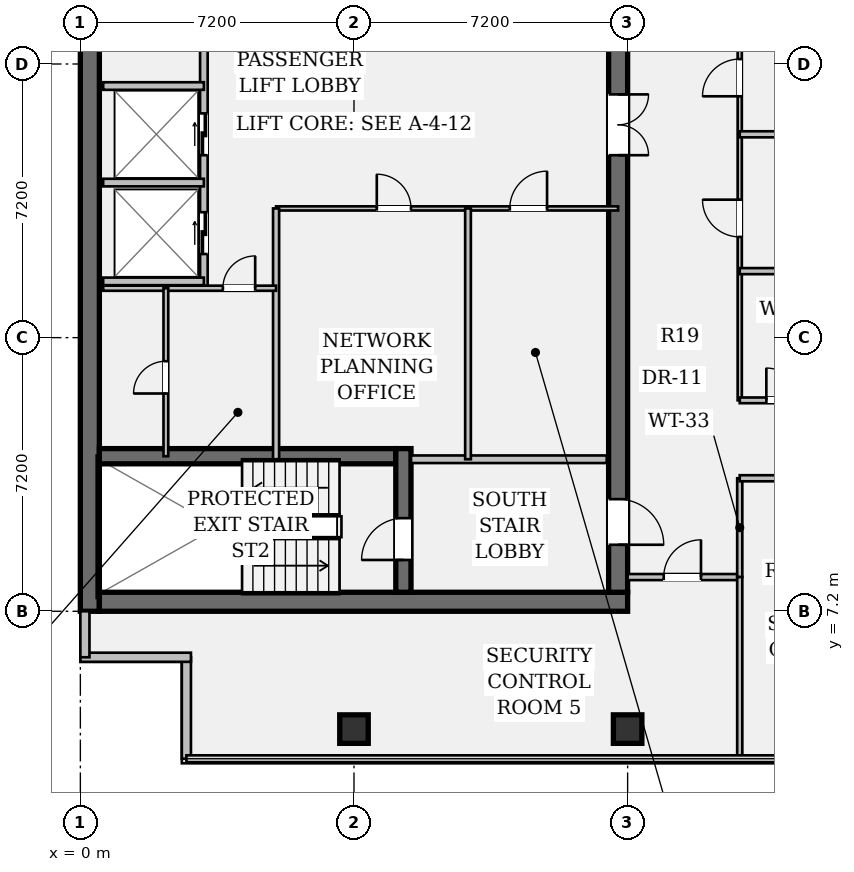
"""IFC4 building model, lengths in metres.
Left out: names, types, materials, properties, quantities, classifications, styles, units other than length and angle.
Written with IfcOpenShell. Run it as: python <this file> out.ifc"""

import sys

from ifc_helpers import new_model, si_unit, direction, frame, frame_2d, origin, origin_2d, place, context, subcontext, project, spatial, rectangle, hollow_rectangle, extrude, element, fill, save


model = new_model("IFC4")
c1 = context("Model", 3, precision=1e-05, world=origin(), true_north=direction((0.0, 1.0)))
c2 = subcontext(c1, "Body", "Model", "MODEL_VIEW")
j1 = project(units=[si_unit("LENGTHUNIT", "METRE"), si_unit("PLANEANGLEUNIT", "RADIAN")], contexts=[c1])
p1 = place(None, origin())
s1 = spatial("IfcSite", under=j1, at=p1, CompositionType="ELEMENT")
p2 = place(p1, origin())
s2 = spatial("IfcBuilding", under=s1, at=p2, CompositionType="ELEMENT")
p3 = place(p2, frame((0.0, 0.0, 218.75)))
s3 = spatial("IfcBuildingStorey", under=s2, at=p3, CompositionType="ELEMENT", Elevation=218.75)
p4 = place(p3, frame((0.25, 7.2, 0.0), z_axis=(0.0, 0.0, 1.0), x_axis=(0.0, 1.0, 0.0)))
e1 = element("IfcWall", 1, at=p4, inside=s3, PredefinedType="SHEAR", context=c2, shape_type="SweptSolid", body=[
    extrude(rectangle(XDim=28.8, YDim=0.5, at=frame_2d((14.4, 0.0))), origin(), (0.0, 0.0, 1.0), 3.24),
])
p5 = place(p3, frame((0.5, 7.45, 0.0), z_axis=(0.0, 0.0, 1.0), x_axis=(1.0, 0.0, 0.0)))
e2 = element("IfcWall", 2, at=p5, inside=s3, PredefinedType="SHEAR", context=c2, shape_type="SweptSolid", body=[
    extrude(rectangle(XDim=13.9, YDim=0.5, at=frame_2d((6.95, 0.0))), origin(), (0.0, 0.0, 1.0), 3.24),
])
p6 = place(p3, frame((14.15, 35.5, 0.0), z_axis=(0.0, 0.0, 1.0), x_axis=(0.0, -1.0, 0.0)))
e3 = element("IfcWall", 3, at=p6, inside=s3, PredefinedType="SHEAR", context=c2, shape_type="SweptSolid", body=[
    extrude(rectangle(XDim=27.8, YDim=0.5, at=frame_2d((13.9, 0.0))), origin(), (0.0, 0.0, 1.0), 3.24),
])
p7 = place(p6, frame((1.4, 0.0, 0.0)))
e4 = element("IfcOpeningElement", 4, at=p7, cuts=e3, PredefinedType="OPENING", context=c2, shape_type="SweptSolid", body=[
    extrude(rectangle(XDim=1.2, YDim=2.15, at=frame_2d((0.6, 1.075))), frame((0.0, 0.262, 0.0), z_axis=(0.0, -1.0, 0.0), x_axis=(1.0, 0.0, 0.0)), (0.0, 0.0, 1.0), 0.524),
])
p8 = place(p6, frame((25.35, 0.0, 0.0)))
e5 = element("IfcOpeningElement", 5, at=p8, cuts=e3, PredefinedType="OPENING", context=c2, shape_type="SweptSolid", body=[
    extrude(rectangle(XDim=1.2, YDim=2.15, at=frame_2d((0.6, 1.075))), frame((0.0, 0.262, 0.0), z_axis=(0.0, -1.0, 0.0), x_axis=(1.0, 0.0, 0.0)), (0.0, 0.0, 1.0), 0.524),
])
p9 = place(p6, frame((14.7, 0.0, 0.0)))
e6 = element("IfcOpeningElement", 6, at=p9, cuts=e3, PredefinedType="OPENING", context=c2, shape_type="SweptSolid", body=[
    extrude(rectangle(XDim=1.6, YDim=2.2, at=frame_2d((0.8, 1.1))), frame((0.0, 0.262, 0.0), z_axis=(0.0, -1.0, 0.0), x_axis=(1.0, 0.0, 0.0)), (0.0, 0.0, 1.0), 0.524),
])
p10 = place(p3, frame((0.5, 11.28, 0.0), z_axis=(0.0, 0.0, 1.0), x_axis=(1.0, 0.0, 0.0)))
e7 = element("IfcWall", 7, at=p10, inside=s3, PredefinedType="SHEAR", context=c2, shape_type="SweptSolid", body=[
    extrude(rectangle(XDim=7.8, YDim=0.4, at=frame_2d((3.9, 0.0))), origin(), (0.0, 0.0, 1.0), 3.24),
])
p11 = place(p3, frame((8.5, 7.7, 0.0), z_axis=(0.0, 0.0, 1.0), x_axis=(0.0, 1.0, 0.0)))
e8 = element("IfcWall", 8, at=p11, inside=s3, PredefinedType="SHEAR", context=c2, shape_type="SweptSolid", body=[
    extrude(rectangle(XDim=3.78, YDim=0.4, at=frame_2d((1.89, 0.0))), origin(), (0.0, 0.0, 1.0), 3.24),
])
p12 = place(p11, frame((0.85, 0.0, 0.0)))
e9 = element("IfcOpeningElement", 9, at=p12, cuts=e8, PredefinedType="OPENING", context=c2, shape_type="SweptSolid", body=[
    extrude(rectangle(XDim=1.1, YDim=2.15, at=frame_2d((0.55, 1.075))), frame((0.0, 0.212, 0.0), z_axis=(0.0, -1.0, 0.0), x_axis=(1.0, 0.0, 0.0)), (0.0, 0.0, 1.0), 0.424),
])
for number, where, z_axis, x_axis in (
    (10, (7.2, 4.1, 0.0), (0.0, 0.0, 1.0), (1.0, 0.0, 0.0)),
    (11, (14.4, 4.1, 0.0), (0.0, 0.0, 1.0), (1.0, 0.0, 0.0)),
):
    element("IfcColumn", number, at=place(p3, frame(where, z_axis=z_axis, x_axis=x_axis)), inside=s3, PredefinedType="COLUMN", context=c2, shape_type="SweptSolid", body=[
        extrude(hollow_rectangle(XDim=0.75, YDim=0.75, WallThickness=0.045, at=origin_2d()), origin(), (0.0, 0.0, 1.0), 3.24),
    ])
p13 = place(p3, frame((2.79, 3.32, 0.0), z_axis=(0.0, 0.0, 1.0), x_axis=(0.0, 1.0, 0.0)))
e12 = element("IfcWall", 12, at=p13, inside=s3, PredefinedType="STANDARD", context=c2, shape_type="SweptSolid", body=[
    extrude(rectangle(XDim=2.67, YDim=0.24, at=frame_2d((1.335, 0.0))), origin(), (0.0, 0.0, 1.0), 3.24),
])
p14 = place(p3, frame((2.91, 5.99, 0.0), z_axis=(0.0, 0.0, 1.0), x_axis=(-1.0, 0.0, 0.0)))
e13 = element("IfcWall", 13, at=p14, inside=s3, PredefinedType="STANDARD", context=c2, shape_type="SweptSolid", body=[
    extrude(rectangle(XDim=2.91, YDim=0.24, at=frame_2d((1.455, 0.0))), origin(), (0.0, 0.0, 1.0), 3.24),
])
p15 = place(p3, frame((0.12, 5.99, 0.0), z_axis=(0.0, 0.0, 1.0), x_axis=(0.0, 1.0, 0.0)))
e14 = element("IfcWall", 14, at=p15, inside=s3, PredefinedType="STANDARD", context=c2, shape_type="SweptSolid", body=[
    extrude(rectangle(XDim=1.21, YDim=0.24, at=frame_2d((0.605, 0.0))), origin(), (0.0, 0.0, 1.0), 3.24),
])
p16 = place(p3, frame((8.7, 11.2, 0.0), z_axis=(0.0, 0.0, 1.0), x_axis=(1.0, 0.0, 0.0)))
e15 = element("IfcWall", 15, at=p16, inside=s3, PredefinedType="PARTITIONING", context=c2, shape_type="SweptSolid", body=[
    extrude(rectangle(XDim=5.15, YDim=0.2, at=frame_2d((2.575, 0.0))), origin(), (0.0, 0.0, 1.0), 3.24),
])
p17 = place(p3, frame((3.25, 15.7, 0.0), z_axis=(0.0, 0.0, 1.0), x_axis=(0.0, 1.0, 0.0)))
e16 = element("IfcWall", 16, at=p17, inside=s3, PredefinedType="PARTITIONING", context=c2, shape_type="SweptSolid", body=[
    extrude(rectangle(XDim=13.08, YDim=0.2, at=frame_2d((6.54, 0.0))), origin(), (0.0, 0.0, 1.0), 3.24),
])
p18 = place(p17, frame((0.9, 0.0, 0.0)))
e17 = element("IfcOpeningElement", 17, at=p18, cuts=e16, PredefinedType="OPENING", context=c2, shape_type="SweptSolid", body=[
    extrude(rectangle(XDim=1.1, YDim=2.2, at=frame_2d((0.55, 1.1))), frame((0.0, 0.112, 0.0), z_axis=(0.0, -1.0, 0.0), x_axis=(1.0, 0.0, 0.0)), (0.0, 0.0, 1.0), 0.224),
])
p19 = place(p17, frame((3.5, 0.0, 0.0)))
e18 = element("IfcOpeningElement", 18, at=p19, cuts=e16, PredefinedType="OPENING", context=c2, shape_type="SweptSolid", body=[
    extrude(rectangle(XDim=1.1, YDim=2.2, at=frame_2d((0.55, 1.1))), frame((0.0, 0.112, 0.0), z_axis=(0.0, -1.0, 0.0), x_axis=(1.0, 0.0, 0.0)), (0.0, 0.0, 1.0), 0.224),
])
p20 = place(p17, frame((7.2, 0.0, 0.0)))
e19 = element("IfcOpeningElement", 19, at=p20, cuts=e16, PredefinedType="OPENING", context=c2, shape_type="SweptSolid", body=[
    extrude(rectangle(XDim=1.1, YDim=2.2, at=frame_2d((0.55, 1.1))), frame((0.0, 0.112, 0.0), z_axis=(0.0, -1.0, 0.0), x_axis=(1.0, 0.0, 0.0)), (0.0, 0.0, 1.0), 0.224),
])
p21 = place(p17, frame((9.8, 0.0, 0.0)))
e20 = element("IfcOpeningElement", 20, at=p21, cuts=e16, PredefinedType="OPENING", context=c2, shape_type="SweptSolid", body=[
    extrude(rectangle(XDim=1.1, YDim=2.2, at=frame_2d((0.55, 1.1))), frame((0.0, 0.112, 0.0), z_axis=(0.0, -1.0, 0.0), x_axis=(1.0, 0.0, 0.0)), (0.0, 0.0, 1.0), 0.224),
])
for number, where, z_axis, x_axis in (
    (21, (0.6, 15.88, 0.0), (0.0, 0.0, 1.0), (1.0, 0.0, 0.0)),
    (22, (0.6, 18.48, 0.0), (0.0, 0.0, 1.0), (1.0, 0.0, 0.0)),
    (23, (0.6, 21.02, 0.0), (0.0, 0.0, 1.0), (1.0, 0.0, 0.0)),
):
    element("IfcWall", number, at=place(p3, frame(where, z_axis=z_axis, x_axis=x_axis)), inside=s3, PredefinedType="PARTITIONING", context=c2, shape_type="SweptSolid", body=[
        extrude(rectangle(XDim=2.65, YDim=0.2, at=frame_2d((1.325, 0.0))), origin(), (0.0, 0.0, 1.0), 3.24),
    ])
p22 = place(p3, frame((5.15, 17.8, 0.0), z_axis=(0.0, 0.0, 1.0), x_axis=(1.0, 0.0, 0.0)))
e24 = element("IfcWall", 24, at=p22, inside=s3, PredefinedType="PARTITIONING", context=c2, shape_type="SweptSolid", body=[
    extrude(rectangle(XDim=9.0, YDim=0.11, at=frame_2d((4.5, 0.0))), origin(), (0.0, 0.0, 1.0), 3.24),
])
p23 = place(p22, frame((2.65, 0.0, 0.0)))
e25 = element("IfcOpeningElement", 25, at=p23, cuts=e24, PredefinedType="OPENING", context=c2, shape_type="SweptSolid", body=[
    extrude(rectangle(XDim=0.9, YDim=2.15, at=frame_2d((0.45, 1.075))), frame((0.0, 0.067, 0.0), z_axis=(0.0, -1.0, 0.0), x_axis=(1.0, 0.0, 0.0)), (0.0, 0.0, 1.0), 0.134),
])
p24 = place(p22, frame((6.15, 0.0, 0.0)))
e26 = element("IfcOpeningElement", 26, at=p24, cuts=e24, PredefinedType="OPENING", context=c2, shape_type="SweptSolid", body=[
    extrude(rectangle(XDim=0.98, YDim=2.15, at=frame_2d((0.49, 1.075))), frame((0.0, 0.067, 0.0), z_axis=(0.0, -1.0, 0.0), x_axis=(1.0, 0.0, 0.0)), (0.0, 0.0, 1.0), 0.134),
])
p25 = place(p3, frame((5.15, 11.2, 0.0), z_axis=(0.0, 0.0, 1.0), x_axis=(0.0, 1.0, 0.0)))
e27 = element("IfcWall", 27, at=p25, inside=s3, PredefinedType="PARTITIONING", context=c2, shape_type="SweptSolid", body=[
    extrude(rectangle(XDim=6.6, YDim=0.16, at=frame_2d((3.3, 0.0))), origin(), (0.0, 0.0, 1.0), 3.24),
])
p26 = place(p3, frame((10.2, 11.2, 0.0), z_axis=(0.0, 0.0, 1.0), x_axis=(0.0, 1.0, 0.0)))
e28 = element("IfcWall", 28, at=p26, inside=s3, PredefinedType="PARTITIONING", context=c2, shape_type="SweptSolid", body=[
    extrude(rectangle(XDim=6.6, YDim=0.15, at=frame_2d((3.3, 0.0))), origin(), (0.0, 0.0, 1.0), 3.24),
])
p27 = place(p3, frame((0.6, 15.7, 0.0), z_axis=(0.0, 0.0, 1.0), x_axis=(1.0, 0.0, 0.0)))
e29 = element("IfcWall", 29, at=p27, inside=s3, PredefinedType="PARTITIONING", context=c2, shape_type="SweptSolid", body=[
    extrude(rectangle(XDim=4.55, YDim=0.135, at=frame_2d((2.275, 0.0))), origin(), (0.0, 0.0, 1.0), 3.24),
])
p28 = place(p27, frame((3.15, 0.0, 0.0)))
e30 = element("IfcOpeningElement", 30, at=p28, cuts=e29, PredefinedType="OPENING", context=c2, shape_type="SweptSolid", body=[
    extrude(rectangle(XDim=0.85, YDim=2.15, at=frame_2d((0.425, 1.075))), frame((0.0, 0.08, 0.0), z_axis=(0.0, -1.0, 0.0), x_axis=(1.0, 0.0, 0.0)), (0.0, 0.0, 1.0), 0.159),
])
p29 = place(p3, frame((2.25, 11.28, 0.0), z_axis=(0.0, 0.0, 1.0), x_axis=(0.0, 1.0, 0.0)))
e31 = element("IfcWall", 31, at=p29, inside=s3, PredefinedType="PARTITIONING", context=c2, shape_type="SweptSolid", body=[
    extrude(rectangle(XDim=4.42, YDim=0.125, at=frame_2d((2.21, 0.0))), origin(), (0.0, 0.0, 1.0), 3.24),
])
p30 = place(p29, frame((1.65, 0.0, 0.0)))
e32 = element("IfcOpeningElement", 32, at=p30, cuts=e31, PredefinedType="OPENING", context=c2, shape_type="SweptSolid", body=[
    extrude(rectangle(XDim=0.85, YDim=2.15, at=frame_2d((0.425, 1.075))), frame((0.0, 0.074, 0.0), z_axis=(0.0, -1.0, 0.0), x_axis=(1.0, 0.0, 0.0)), (0.0, 0.0, 1.0), 0.149),
])
p31 = place(p3, frame((14.4, 8.1, 0.0), z_axis=(0.0, 0.0, 1.0), x_axis=(1.0, 0.0, 0.0)))
e33 = element("IfcWall", 33, at=p31, inside=s3, PredefinedType="PARTITIONING", context=c2, shape_type="SweptSolid", body=[
    extrude(rectangle(XDim=2.95, YDim=0.16, at=frame_2d((1.475, 0.0))), origin(), (0.0, 0.0, 1.0), 2.808),
])
p32 = place(p31, frame((0.95, 0.0, 0.0)))
e34 = element("IfcOpeningElement", 34, at=p32, cuts=e33, PredefinedType="OPENING", context=c2, shape_type="SweptSolid", body=[
    extrude(rectangle(XDim=0.98, YDim=2.15, at=frame_2d((0.49, 1.075))), frame((0.0, 0.092, 0.0), z_axis=(0.0, -1.0, 0.0), x_axis=(1.0, 0.0, 0.0)), (0.0, 0.0, 1.0), 0.184),
])
p33 = place(p3, frame((17.35, 8.1, 0.0), z_axis=(0.0, 0.0, 1.0), x_axis=(0.0, 1.0, 0.0)))
e35 = element("IfcWall", 35, at=p33, inside=s3, PredefinedType="PARTITIONING", context=c2, shape_type="SweptSolid", body=[
    extrude(rectangle(XDim=2.6, YDim=0.135, at=frame_2d((1.3, 0.0))), origin(), (0.0, 0.0, 1.0), 3.24),
])
p34 = place(p3, frame((17.35, 12.75, 0.0), z_axis=(0.0, 0.0, 1.0), x_axis=(0.0, 1.0, 0.0)))
e36 = element("IfcWall", 36, at=p34, inside=s3, PredefinedType="PARTITIONING", context=c2, shape_type="SweptSolid", body=[
    extrude(rectangle(XDim=22.45, YDim=0.11, at=frame_2d((11.225, 0.0))), origin(), (0.0, 0.0, 1.0), 2.613),
])
p35 = place(p34, frame((4.3, 0.0, 0.0)))
e37 = element("IfcOpeningElement", 37, at=p35, cuts=e36, PredefinedType="OPENING", context=c2, shape_type="SweptSolid", body=[
    extrude(rectangle(XDim=0.98, YDim=2.15, at=frame_2d((0.49, 1.075))), frame((0.0, 0.067, 0.0), z_axis=(0.0, -1.0, 0.0), x_axis=(1.0, 0.0, 0.0)), (0.0, 0.0, 1.0), 0.134),
])
p36 = place(p34, frame((8.0, 0.0, 0.0)))
e38 = element("IfcOpeningElement", 38, at=p36, cuts=e36, PredefinedType="OPENING", context=c2, shape_type="SweptSolid", body=[
    extrude(rectangle(XDim=0.98, YDim=2.15, at=frame_2d((0.49, 1.075))), frame((0.0, 0.067, 0.0), z_axis=(0.0, -1.0, 0.0), x_axis=(1.0, 0.0, 0.0)), (0.0, 0.0, 1.0), 0.134),
])
p37 = place(p34, frame((16.02, 0.0, 0.0)))
e39 = element("IfcOpeningElement", 39, at=p37, cuts=e36, PredefinedType="OPENING", context=c2, shape_type="SweptSolid", body=[
    extrude(rectangle(XDim=0.98, YDim=2.15, at=frame_2d((0.49, 1.075))), frame((0.0, 0.067, 0.0), z_axis=(0.0, -1.0, 0.0), x_axis=(1.0, 0.0, 0.0)), (0.0, 0.0, 1.0), 0.134),
])
p38 = place(p3, frame((17.35, 10.7, 0.0), z_axis=(0.0, 0.0, 1.0), x_axis=(1.0, 0.0, 0.0)))
e40 = element("IfcWall", 40, at=p38, inside=s3, PredefinedType="PARTITIONING", context=c2, shape_type="SweptSolid", body=[
    extrude(rectangle(XDim=15.6, YDim=0.16, at=frame_2d((7.8, 0.0))), origin(), (0.0, 0.0, 1.0), 2.613),
])
p39 = place(p38, frame((2.02, 0.0, 0.0)))
e41 = element("IfcOpeningElement", 41, at=p39, cuts=e40, PredefinedType="OPENING", context=c2, shape_type="SweptSolid", body=[
    extrude(rectangle(XDim=0.98, YDim=2.15, at=frame_2d((0.49, 1.075))), frame((0.0, 0.092, 0.0), z_axis=(0.0, -1.0, 0.0), x_axis=(1.0, 0.0, 0.0)), (0.0, 0.0, 1.0), 0.184),
])
p40 = place(p38, frame((7.15, 0.0, 0.0)))
e42 = element("IfcOpeningElement", 42, at=p40, cuts=e40, PredefinedType="OPENING", context=c2, shape_type="SweptSolid", body=[
    extrude(rectangle(XDim=0.98, YDim=2.15, at=frame_2d((0.49, 1.075))), frame((0.0, 0.092, 0.0), z_axis=(0.0, -1.0, 0.0), x_axis=(1.0, 0.0, 0.0)), (0.0, 0.0, 1.0), 0.184),
])
p41 = place(p38, frame((12.43, 0.0, 0.0)))
e43 = element("IfcOpeningElement", 43, at=p41, cuts=e40, PredefinedType="OPENING", context=c2, shape_type="SweptSolid", body=[
    extrude(rectangle(XDim=0.98, YDim=2.15, at=frame_2d((0.49, 1.075))), frame((0.0, 0.092, 0.0), z_axis=(0.0, -1.0, 0.0), x_axis=(1.0, 0.0, 0.0)), (0.0, 0.0, 1.0), 0.184),
])
p42 = place(p3, frame((17.35, 12.75, 0.0), z_axis=(0.0, 0.0, 1.0), x_axis=(1.0, 0.0, 0.0)))
e44 = element("IfcWall", 44, at=p42, inside=s3, PredefinedType="PARTITIONING", context=c2, shape_type="SweptSolid", body=[
    extrude(rectangle(XDim=15.6, YDim=0.15, at=frame_2d((7.8, 0.0))), origin(), (0.0, 0.0, 1.0), 2.613),
])
p43 = place(p42, frame((0.7, 0.0, 0.0)))
e45 = element("IfcOpeningElement", 45, at=p43, cuts=e44, PredefinedType="OPENING", context=c2, shape_type="SweptSolid", body=[
    extrude(rectangle(XDim=0.85, YDim=2.15, at=frame_2d((0.425, 1.075))), frame((0.0, 0.087, 0.0), z_axis=(0.0, -1.0, 0.0), x_axis=(1.0, 0.0, 0.0)), (0.0, 0.0, 1.0), 0.174),
])
p44 = place(p42, frame((3.95, 0.0, 0.0)))
e46 = element("IfcOpeningElement", 46, at=p44, cuts=e44, PredefinedType="OPENING", context=c2, shape_type="SweptSolid", body=[
    extrude(rectangle(XDim=0.85, YDim=2.15, at=frame_2d((0.425, 1.075))), frame((0.0, 0.087, 0.0), z_axis=(0.0, -1.0, 0.0), x_axis=(1.0, 0.0, 0.0)), (0.0, 0.0, 1.0), 0.174),
])
p45 = place(p42, frame((6.46, 0.0, 0.0)))
e47 = element("IfcOpeningElement", 47, at=p45, cuts=e44, PredefinedType="OPENING", context=c2, shape_type="SweptSolid", body=[
    extrude(rectangle(XDim=0.85, YDim=2.15, at=frame_2d((0.425, 1.075))), frame((0.0, 0.087, 0.0), z_axis=(0.0, -1.0, 0.0), x_axis=(1.0, 0.0, 0.0)), (0.0, 0.0, 1.0), 0.174),
])
p46 = place(p42, frame((9.5, 0.0, 0.0)))
e48 = element("IfcOpeningElement", 48, at=p46, cuts=e44, PredefinedType="OPENING", context=c2, shape_type="SweptSolid", body=[
    extrude(rectangle(XDim=0.98, YDim=2.15, at=frame_2d((0.49, 1.075))), frame((0.0, 0.087, 0.0), z_axis=(0.0, -1.0, 0.0), x_axis=(1.0, 0.0, 0.0)), (0.0, 0.0, 1.0), 0.174),
])
p47 = place(p3, frame((17.35, 16.15, 0.0), z_axis=(0.0, 0.0, 1.0), x_axis=(1.0, 0.0, 0.0)))
e49 = element("IfcWall", 49, at=p47, inside=s3, PredefinedType="PARTITIONING", context=c2, shape_type="SweptSolid", body=[
    extrude(rectangle(XDim=8.85, YDim=0.16, at=frame_2d((4.425, 0.0))), origin(), (0.0, 0.0, 1.0), 2.613),
])
p48 = place(p3, frame((17.35, 19.75, 0.0), z_axis=(0.0, 0.0, 1.0), x_axis=(1.0, 0.0, 0.0)))
e50 = element("IfcWall", 50, at=p48, inside=s3, PredefinedType="PARTITIONING", context=c2, shape_type="SweptSolid", body=[
    extrude(rectangle(XDim=6.53, YDim=0.16, at=frame_2d((3.265, 0.0))), origin(), (0.0, 0.0, 1.0), 2.613),
])
p49 = place(p3, frame((17.35, 3.32, 0.0), z_axis=(0.0, 0.0, 1.0), x_axis=(0.0, 1.0, 0.0)))
e51 = element("IfcWall", 51, at=p49, inside=s3, PredefinedType="PARTITIONING", context=c2, shape_type="SweptSolid", body=[
    extrude(rectangle(XDim=4.78, YDim=0.135, at=frame_2d((2.39, 0.0))), origin(), (0.0, 0.0, 1.0), 2.613),
])
p50 = place(p12, origin())
e52 = element("IfcDoor", 52, at=p50, inside=s3, OperationType="SINGLE_SWING_LEFT", PredefinedType="DOOR", context=c2, shape_type="SweptSolid", body=[
    extrude(rectangle(XDim=1.1, YDim=2.15, at=frame_2d((0.55, 1.075))), frame((0.0, 0.025, 0.0), z_axis=(0.0, -1.0, 0.0), x_axis=(1.0, 0.0, 0.0)), (0.0, 0.0, 1.0), 0.05),
])
fill(e9, e52)
p51 = place(p8, origin())
e53 = element("IfcDoor", 53, at=p51, inside=s3, OperationType="SINGLE_SWING_RIGHT", PredefinedType="DOOR", context=c2, shape_type="SweptSolid", body=[
    extrude(rectangle(XDim=1.2, YDim=2.15, at=frame_2d((0.6, 1.075))), frame((0.0, 0.025, 0.0), z_axis=(0.0, -1.0, 0.0), x_axis=(1.0, 0.0, 0.0)), (0.0, 0.0, 1.0), 0.05),
])
fill(e5, e53)
p52 = place(p9, origin())
e54 = element("IfcDoor", 54, at=p52, inside=s3, OperationType="DOUBLE_DOOR_SINGLE_SWING", PredefinedType="DOOR", context=c2, shape_type="SweptSolid", body=[
    extrude(rectangle(XDim=1.6, YDim=2.2, at=frame_2d((0.8, 1.1))), frame((0.0, 0.025, 0.0), z_axis=(0.0, -1.0, 0.0), x_axis=(1.0, 0.0, 0.0)), (0.0, 0.0, 1.0), 0.05),
])
fill(e6, e54)
p53 = place(p18, origin())
e55 = element("IfcDoor", 55, at=p53, inside=s3, OperationType="DOUBLE_DOOR_SLIDING", PredefinedType="DOOR", context=c2, shape_type="SweptSolid", body=[
    extrude(rectangle(XDim=1.1, YDim=2.2, at=frame_2d((0.55, 1.1))), frame((0.0, 0.025, 0.0), z_axis=(0.0, -1.0, 0.0), x_axis=(1.0, 0.0, 0.0)), (0.0, 0.0, 1.0), 0.05),
])
fill(e17, e55)
p54 = place(p19, origin())
e56 = element("IfcDoor", 56, at=p54, inside=s3, OperationType="DOUBLE_DOOR_SLIDING", PredefinedType="DOOR", context=c2, shape_type="SweptSolid", body=[
    extrude(rectangle(XDim=1.1, YDim=2.2, at=frame_2d((0.55, 1.1))), frame((0.0, 0.025, 0.0), z_axis=(0.0, -1.0, 0.0), x_axis=(1.0, 0.0, 0.0)), (0.0, 0.0, 1.0), 0.05),
])
fill(e18, e56)
p55 = place(p23, origin())
e57 = element("IfcDoor", 57, at=p55, inside=s3, OperationType="SINGLE_SWING_LEFT", PredefinedType="DOOR", context=c2, shape_type="SweptSolid", body=[
    extrude(rectangle(XDim=0.9, YDim=2.15, at=frame_2d((0.45, 1.075))), frame((0.0, 0.025, 0.0), z_axis=(0.0, -1.0, 0.0), x_axis=(1.0, 0.0, 0.0)), (0.0, 0.0, 1.0), 0.05),
])
fill(e25, e57)
p56 = place(p24, origin())
e58 = element("IfcDoor", 58, at=p56, inside=s3, OperationType="SINGLE_SWING_RIGHT", PredefinedType="DOOR", context=c2, shape_type="SweptSolid", body=[
    extrude(rectangle(XDim=0.98, YDim=2.15, at=frame_2d((0.49, 1.075))), frame((0.0, 0.025, 0.0), z_axis=(0.0, -1.0, 0.0), x_axis=(1.0, 0.0, 0.0)), (0.0, 0.0, 1.0), 0.05),
])
fill(e26, e58)
p57 = place(p28, origin())
e59 = element("IfcDoor", 59, at=p57, inside=s3, OperationType="SINGLE_SWING_RIGHT", PredefinedType="DOOR", context=c2, shape_type="SweptSolid", body=[
    extrude(rectangle(XDim=0.85, YDim=2.15, at=frame_2d((0.425, 1.075))), frame((0.0, 0.025, 0.0), z_axis=(0.0, -1.0, 0.0), x_axis=(1.0, 0.0, 0.0)), (0.0, 0.0, 1.0), 0.05),
])
fill(e30, e59)
p58 = place(p30, origin())
e60 = element("IfcDoor", 60, at=p58, inside=s3, OperationType="SINGLE_SWING_LEFT", PredefinedType="DOOR", context=c2, shape_type="SweptSolid", body=[
    extrude(rectangle(XDim=0.85, YDim=2.15, at=frame_2d((0.425, 1.075))), frame((0.0, 0.025, 0.0), z_axis=(0.0, -1.0, 0.0), x_axis=(1.0, 0.0, 0.0)), (0.0, 0.0, 1.0), 0.05),
])
fill(e32, e60)
p59 = place(p43, origin())
e61 = element("IfcDoor", 61, at=p59, inside=s3, OperationType="SINGLE_SWING_LEFT", PredefinedType="DOOR", context=c2, shape_type="SweptSolid", body=[
    extrude(rectangle(XDim=0.85, YDim=2.15, at=frame_2d((0.425, 1.075))), frame((0.0, 0.025, 0.0), z_axis=(0.0, -1.0, 0.0), x_axis=(1.0, 0.0, 0.0)), (0.0, 0.0, 1.0), 0.05),
])
fill(e45, e61)
p60 = place(p35, origin())
e62 = element("IfcDoor", 62, at=p60, inside=s3, OperationType="SINGLE_SWING_RIGHT", PredefinedType="DOOR", context=c2, shape_type="SweptSolid", body=[
    extrude(rectangle(XDim=0.98, YDim=2.15, at=frame_2d((0.49, 1.075))), frame((0.0, 0.025, 0.0), z_axis=(0.0, -1.0, 0.0), x_axis=(1.0, 0.0, 0.0)), (0.0, 0.0, 1.0), 0.05),
])
fill(e37, e62)
p61 = place(p36, origin())
e63 = element("IfcDoor", 63, at=p61, inside=s3, OperationType="SINGLE_SWING_LEFT", PredefinedType="DOOR", context=c2, shape_type="SweptSolid", body=[
    extrude(rectangle(XDim=0.98, YDim=2.15, at=frame_2d((0.49, 1.075))), frame((0.0, 0.025, 0.0), z_axis=(0.0, -1.0, 0.0), x_axis=(1.0, 0.0, 0.0)), (0.0, 0.0, 1.0), 0.05),
])
fill(e38, e63)
p62 = place(p32, origin())
e64 = element("IfcDoor", 64, at=p62, inside=s3, OperationType="SINGLE_SWING_RIGHT", PredefinedType="DOOR", context=c2, shape_type="SweptSolid", body=[
    extrude(rectangle(XDim=0.98, YDim=2.15, at=frame_2d((0.49, 1.075))), frame((0.0, 0.025, 0.0), z_axis=(0.0, -1.0, 0.0), x_axis=(1.0, 0.0, 0.0)), (0.0, 0.0, 1.0), 0.05),
])
fill(e34, e64)
save(model, sys.argv[1])
